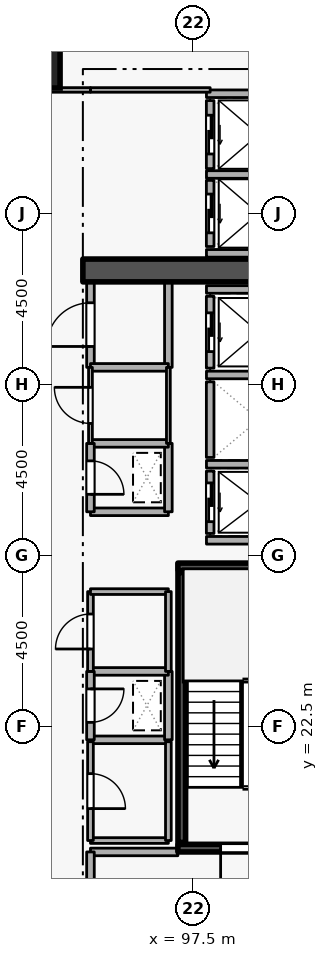
"""IFC4 building model, lengths in metres.
Left out: names, types, materials, properties, quantities, classifications, styles, units other than length and angle.
Written with IfcOpenShell. Run it as: python <this file> out.ifc"""

import sys

from ifc_helpers import new_model, si_unit, direction, frame, frame_2d, origin, origin_2d, place, context, subcontext, project, spatial, rectangle, extrude, element, fill, save


model = new_model("IFC4")
c1 = context("Model", 3, precision=1e-05, world=origin(), true_north=direction((0.0, 1.0)))
c2 = subcontext(c1, "Body", "Model", "MODEL_VIEW")
j1 = project(units=[si_unit("LENGTHUNIT", "METRE"), si_unit("PLANEANGLEUNIT", "RADIAN")], contexts=[c1])
p1 = place(None, origin())
s1 = spatial("IfcSite", under=j1, at=p1, CompositionType="ELEMENT")
p2 = place(p1, origin())
s2 = spatial("IfcBuilding", under=s1, at=p2, CompositionType="ELEMENT")
p3 = place(p2, frame((0.0, 0.0, 60.9)))
s3 = spatial("IfcBuildingStorey", under=s2, at=p3, CompositionType="ELEMENT", Elevation=60.9)
p4 = place(p3, frame((94.6, 34.5, 0.0), z_axis=(0.0, 0.0, 1.0), x_axis=(1.0, 0.0, 0.0)))
e1 = element("IfcWall", 1, at=p4, inside=s3, PredefinedType="SHEAR", context=c2, shape_type="SweptSolid", body=[
    extrude(rectangle(XDim=5.7, YDim=0.6, at=frame_2d((2.85, 0.0))), origin(), (0.0, 0.0, 1.0), 3.6),
])
p5 = place(p3, frame((93.3, 40.0, 0.0), z_axis=(0.0, 0.0, 1.0), x_axis=(1.0, 0.0, 0.0)))
e2 = element("IfcColumn", 2, at=p5, inside=s3, PredefinedType="COLUMN", context=c2, shape_type="SweptSolid", body=[
    extrude(rectangle(XDim=1.4, YDim=1.4, at=origin_2d()), origin(), (0.0, 0.0, 1.0), 3.6),
])
p6 = place(p3, frame((97.95, 29.22, 0.0), z_axis=(0.0, 0.0, 1.0), x_axis=(0.0, -1.0, 0.0)))
e3 = element("IfcWall", 3, at=p6, inside=s3, PredefinedType="STANDARD", context=c2, shape_type="SweptSolid", body=[
    extrude(rectangle(XDim=1.64, YDim=0.2, at=frame_2d((0.82, 0.0))), origin(), (0.0, 0.0, 1.0), 3.34),
])
p7 = place(p6, frame((0.31, 0.0, 0.0)))
e4 = element("IfcOpeningElement", 4, at=p7, cuts=e3, PredefinedType="OPENING", context=c2, shape_type="SweptSolid", body=[
    extrude(rectangle(XDim=1.02, YDim=2.06, at=frame_2d((0.51, 1.03))), frame((0.0, 0.11, 0.0), z_axis=(0.0, -1.0, 0.0), x_axis=(1.0, 0.0, 0.0)), (0.0, 0.0, 1.0), 0.22),
])
p8 = place(p3, frame((97.95, 31.57, 0.0), z_axis=(0.0, 0.0, 1.0), x_axis=(0.0, -1.0, 0.0)))
e5 = element("IfcWall", 5, at=p8, inside=s3, PredefinedType="STANDARD", context=c2, shape_type="SweptSolid", body=[
    extrude(rectangle(XDim=1.99, YDim=0.2, at=frame_2d((0.995, 0.0))), origin(), (0.0, 0.0, 1.0), 3.34),
])
p9 = place(p3, frame((97.95, 33.82, 0.0), z_axis=(0.0, 0.0, 1.0), x_axis=(0.0, -1.0, 0.0)))
e6 = element("IfcWall", 6, at=p9, inside=s3, PredefinedType="STANDARD", context=c2, shape_type="SweptSolid", body=[
    extrude(rectangle(XDim=1.89, YDim=0.2, at=frame_2d((0.945, 0.0))), origin(), (0.0, 0.0, 1.0), 3.34),
])
p10 = place(p9, frame((0.435, 0.0, 0.0)))
e7 = element("IfcOpeningElement", 7, at=p10, cuts=e6, PredefinedType="OPENING", context=c2, shape_type="SweptSolid", body=[
    extrude(rectangle(XDim=1.02, YDim=2.06, at=frame_2d((0.51, 1.03))), frame((0.0, 0.11, 0.0), z_axis=(0.0, -1.0, 0.0), x_axis=(1.0, 0.0, 0.0)), (0.0, 0.0, 1.0), 0.22),
])
p11 = place(p3, frame((97.95, 36.87, 0.0), z_axis=(0.0, 0.0, 1.0), x_axis=(0.0, -1.0, 0.0)))
e8 = element("IfcWall", 8, at=p11, inside=s3, PredefinedType="STANDARD", context=c2, shape_type="SweptSolid", body=[
    extrude(rectangle(XDim=1.74, YDim=0.2, at=frame_2d((0.87, 0.0))), origin(), (0.0, 0.0, 1.0), 3.34),
])
p12 = place(p11, frame((0.36, 0.0, 0.0)))
e9 = element("IfcOpeningElement", 9, at=p12, cuts=e8, PredefinedType="OPENING", context=c2, shape_type="SweptSolid", body=[
    extrude(rectangle(XDim=1.02, YDim=2.06, at=frame_2d((0.51, 1.03))), frame((0.0, 0.11, 0.0), z_axis=(0.0, -1.0, 0.0), x_axis=(1.0, 0.0, 0.0)), (0.0, 0.0, 1.0), 0.22),
])
p13 = place(p3, frame((97.95, 38.97, 0.0), z_axis=(0.0, 0.0, 1.0), x_axis=(0.0, -1.0, 0.0)))
e10 = element("IfcWall", 10, at=p13, inside=s3, PredefinedType="STANDARD", context=c2, shape_type="SweptSolid", body=[
    extrude(rectangle(XDim=1.79, YDim=0.2, at=frame_2d((0.895, 0.0))), origin(), (0.0, 0.0, 1.0), 3.34),
])
p14 = place(p13, frame((0.385, 0.0, 0.0)))
e11 = element("IfcOpeningElement", 11, at=p14, cuts=e10, PredefinedType="OPENING", context=c2, shape_type="SweptSolid", body=[
    extrude(rectangle(XDim=1.02, YDim=2.06, at=frame_2d((0.51, 1.03))), frame((0.0, 0.11, 0.0), z_axis=(0.0, -1.0, 0.0), x_axis=(1.0, 0.0, 0.0)), (0.0, 0.0, 1.0), 0.22),
])
for number, where, z_axis, x_axis in (
    (12, (97.852, 29.4, 0.0), (0.0, 0.0, 1.0), (1.0, 0.0, 0.0)),
    (13, (97.852, 27.4, 0.0), (0.0, 0.0, 1.0), (1.0, 0.0, 0.0)),
    (14, (97.852, 31.75, 0.0), (0.0, 0.0, 1.0), (1.0, 0.0, 0.0)),
    (15, (97.852, 34.0, 0.0), (0.0, 0.0, 1.0), (1.0, 0.0, 0.0)),
):
    element("IfcWall", number, at=place(p3, frame(where, z_axis=z_axis, x_axis=x_axis)), inside=s3, PredefinedType="STANDARD", context=c2, shape_type="SweptSolid", body=[
        extrude(rectangle(XDim=2.436, YDim=0.2, at=frame_2d((1.218, 0.0))), origin(), (0.0, 0.0, 1.0), 3.34),
    ])
for number, where, z_axis, x_axis in (
    (16, (97.852, 37.025, 0.0), (0.0, 0.0, 1.0), (1.0, 0.0, 0.0)),
    (17, (97.852, 34.95, 0.0), (0.0, 0.0, 1.0), (1.0, 0.0, 0.0)),
):
    element("IfcWall", number, at=place(p3, frame(where, z_axis=z_axis, x_axis=x_axis)), inside=s3, PredefinedType="STANDARD", context=c2, shape_type="SweptSolid", body=[
        extrude(rectangle(XDim=2.746, YDim=0.2, at=frame_2d((1.373, 0.0))), origin(), (0.0, 0.0, 1.0), 3.34),
    ])
p15 = place(p3, frame((97.852, 39.15, 0.0), z_axis=(0.0, 0.0, 1.0), x_axis=(1.0, 0.0, 0.0)))
e18 = element("IfcWall", 18, at=p15, inside=s3, PredefinedType="STANDARD", context=c2, shape_type="SweptSolid", body=[
    extrude(rectangle(XDim=2.636, YDim=0.2, at=frame_2d((1.318, 0.0))), origin(), (0.0, 0.0, 1.0), 3.34),
])
p16 = place(p3, frame((100.45, 19.3, 0.0), z_axis=(0.0, 0.0, 1.0), x_axis=(-1.0, 0.0, 0.0)))
e19 = element("IfcWall", 19, at=p16, inside=s3, PredefinedType="SHEAR", context=c2, shape_type="SweptSolid", body=[
    extrude(rectangle(XDim=3.35, YDim=0.2, at=frame_2d((1.675, 0.0))), origin(), (0.0, 0.0, 1.0), 3.6),
])
p17 = place(p16, frame((1.125, 0.0, 0.0)))
e20 = element("IfcOpeningElement", 20, at=p17, cuts=e19, PredefinedType="OPENING", context=c2, shape_type="SweptSolid", body=[
    extrude(rectangle(XDim=1.1, YDim=2.1, at=frame_2d((0.55, 1.05))), frame((0.0, 0.11, 0.0), z_axis=(0.0, -1.0, 0.0), x_axis=(1.0, 0.0, 0.0)), (0.0, 0.0, 1.0), 0.22),
])
p18 = place(p3, frame((97.1, 26.7, 0.0), z_axis=(0.0, 0.0, 1.0), x_axis=(1.0, 0.0, 0.0)))
e21 = element("IfcWall", 21, at=p18, inside=s3, PredefinedType="SHEAR", context=c2, shape_type="SweptSolid", body=[
    extrude(rectangle(XDim=3.35, YDim=0.2, at=frame_2d((1.675, 0.0))), origin(), (0.0, 0.0, 1.0), 3.6),
])
p19 = place(p3, frame((97.203, 26.55, 0.0), z_axis=(0.0, 0.0, 1.0), x_axis=(0.0, -1.0, 0.0)))
e22 = element("IfcWall", 22, at=p19, inside=s3, PredefinedType="SHEAR", context=c2, shape_type="SweptSolid", body=[
    extrude(rectangle(XDim=7.1, YDim=0.2, at=frame_2d((3.55, 0.0))), origin(), (0.0, 0.0, 1.0), 3.6),
])
p20 = place(p3, frame((97.1, 19.2, 0.0), z_axis=(0.0, 0.0, 1.0), x_axis=(-1.0, 0.0, 0.0)))
e23 = element("IfcWall", 23, at=p20, inside=s3, PredefinedType="STANDARD", context=c2, shape_type="SweptSolid", body=[
    extrude(rectangle(XDim=2.3, YDim=0.2, at=frame_2d((1.15, 0.0))), origin(), (0.0, 0.0, 1.0), 2.545),
])
p21 = place(p3, frame((94.8, 19.2, 0.0), z_axis=(0.0, 0.0, 1.0), x_axis=(0.0, -1.0, 0.0)))
e24 = element("IfcWall", 24, at=p21, inside=s3, PredefinedType="STANDARD", context=c2, shape_type="SweptSolid", body=[
    extrude(rectangle(XDim=2.5, YDim=0.2, at=frame_2d((1.25, 0.0))), origin(), (0.0, 0.0, 1.0), 3.34),
])
p22 = place(p3, frame((94.8, 28.15, 0.0), z_axis=(0.0, 0.0, 1.0), x_axis=(1.0, 0.0, 0.0)))
e25 = element("IfcWall", 25, at=p22, inside=s3, PredefinedType="STANDARD", context=c2, shape_type="SweptSolid", body=[
    extrude(rectangle(XDim=2.05, YDim=0.2, at=frame_2d((1.025, 0.0))), origin(), (0.0, 0.0, 1.0), 3.34),
])
p23 = place(p3, frame((96.85, 28.15, 0.0), z_axis=(0.0, 0.0, 1.0), x_axis=(0.0, 1.0, 0.0)))
e26 = element("IfcWall", 26, at=p23, inside=s3, PredefinedType="STANDARD", context=c2, shape_type="SweptSolid", body=[
    extrude(rectangle(XDim=1.8, YDim=0.2, at=frame_2d((0.9, 0.0))), origin(), (0.0, 0.0, 1.0), 3.34),
])
p24 = place(p3, frame((96.85, 29.95, 0.0), z_axis=(0.0, 0.0, 1.0), x_axis=(-1.0, 0.0, 0.0)))
e27 = element("IfcWall", 27, at=p24, inside=s3, PredefinedType="STANDARD", context=c2, shape_type="SweptSolid", body=[
    extrude(rectangle(XDim=2.05, YDim=0.2, at=frame_2d((1.025, 0.0))), origin(), (0.0, 0.0, 1.0), 3.34),
])
p25 = place(p3, frame((94.8, 29.95, 0.0), z_axis=(0.0, 0.0, 1.0), x_axis=(0.0, -1.0, 0.0)))
e28 = element("IfcWall", 28, at=p25, inside=s3, PredefinedType="STANDARD", context=c2, shape_type="SweptSolid", body=[
    extrude(rectangle(XDim=1.8, YDim=0.2, at=frame_2d((0.9, 0.0))), origin(), (0.0, 0.0, 1.0), 3.34),
])
p26 = place(p25, frame((0.46, 0.0, 0.0)))
e29 = element("IfcOpeningElement", 29, at=p26, cuts=e28, PredefinedType="OPENING", context=c2, shape_type="SweptSolid", body=[
    extrude(rectangle(XDim=0.88, YDim=2.04, at=frame_2d((0.44, 1.02))), frame((0.0, 0.11, 0.0), z_axis=(0.0, -1.0, 0.0), x_axis=(1.0, 0.0, 0.0)), (0.0, 0.0, 1.0), 0.22),
])
p27 = place(p3, frame((94.8, 22.15, 0.0), z_axis=(0.0, 0.0, 1.0), x_axis=(1.0, 0.0, 0.0)))
e30 = element("IfcWall", 30, at=p27, inside=s3, PredefinedType="STANDARD", context=c2, shape_type="SweptSolid", body=[
    extrude(rectangle(XDim=2.05, YDim=0.2, at=frame_2d((1.025, 0.0))), origin(), (0.0, 0.0, 1.0), 3.34),
])
p28 = place(p3, frame((96.85, 22.15, 0.0), z_axis=(0.0, 0.0, 1.0), x_axis=(0.0, 1.0, 0.0)))
e31 = element("IfcWall", 31, at=p28, inside=s3, PredefinedType="STANDARD", context=c2, shape_type="SweptSolid", body=[
    extrude(rectangle(XDim=1.8, YDim=0.2, at=frame_2d((0.9, 0.0))), origin(), (0.0, 0.0, 1.0), 3.34),
])
p29 = place(p3, frame((96.85, 23.95, 0.0), z_axis=(0.0, 0.0, 1.0), x_axis=(-1.0, 0.0, 0.0)))
e32 = element("IfcWall", 32, at=p29, inside=s3, PredefinedType="STANDARD", context=c2, shape_type="SweptSolid", body=[
    extrude(rectangle(XDim=2.05, YDim=0.2, at=frame_2d((1.025, 0.0))), origin(), (0.0, 0.0, 1.0), 3.34),
])
p30 = place(p3, frame((94.8, 23.95, 0.0), z_axis=(0.0, 0.0, 1.0), x_axis=(0.0, -1.0, 0.0)))
e33 = element("IfcWall", 33, at=p30, inside=s3, PredefinedType="STANDARD", context=c2, shape_type="SweptSolid", body=[
    extrude(rectangle(XDim=1.8, YDim=0.2, at=frame_2d((0.9, 0.0))), origin(), (0.0, 0.0, 1.0), 3.34),
])
p31 = place(p30, frame((0.46, 0.0, 0.0)))
e34 = element("IfcOpeningElement", 34, at=p31, cuts=e33, PredefinedType="OPENING", context=c2, shape_type="SweptSolid", body=[
    extrude(rectangle(XDim=0.88, YDim=2.04, at=frame_2d((0.44, 1.02))), frame((0.0, 0.11, 0.0), z_axis=(0.0, -1.0, 0.0), x_axis=(1.0, 0.0, 0.0)), (0.0, 0.0, 1.0), 0.22),
])
p32 = place(p3, frame((94.8, 31.95, 0.0), z_axis=(0.0, 0.0, 1.0), x_axis=(0.0, 1.0, 0.0)))
e35 = element("IfcWall", 35, at=p32, inside=s3, PredefinedType="STANDARD", context=c2, shape_type="SweptSolid", body=[
    extrude(rectangle(XDim=2.25, YDim=0.2, at=frame_2d((1.125, 0.0))), origin(), (0.0, 0.0, 1.0), 3.34),
])
p33 = place(p32, frame((0.55, 0.0, 0.0)))
e36 = element("IfcOpeningElement", 36, at=p33, cuts=e35, PredefinedType="OPENING", context=c2, shape_type="SweptSolid", body=[
    extrude(rectangle(XDim=1.15, YDim=2.1, at=frame_2d((0.575, 1.05))), frame((0.0, 0.11, 0.0), z_axis=(0.0, -1.0, 0.0), x_axis=(1.0, 0.0, 0.0)), (0.0, 0.0, 1.0), 0.22),
])
p34 = place(p3, frame((96.85, 34.2, 0.0), z_axis=(0.0, 0.0, 1.0), x_axis=(0.0, -1.0, 0.0)))
e37 = element("IfcWall", 37, at=p34, inside=s3, PredefinedType="STANDARD", context=c2, shape_type="SweptSolid", body=[
    extrude(rectangle(XDim=2.25, YDim=0.2, at=frame_2d((1.125, 0.0))), origin(), (0.0, 0.0, 1.0), 3.34),
])
p35 = place(p3, frame((96.85, 31.95, 0.0), z_axis=(0.0, 0.0, 1.0), x_axis=(-1.0, 0.0, 0.0)))
e38 = element("IfcWall", 38, at=p35, inside=s3, PredefinedType="STANDARD", context=c2, shape_type="SweptSolid", body=[
    extrude(rectangle(XDim=2.05, YDim=0.2, at=frame_2d((1.025, 0.0))), origin(), (0.0, 0.0, 1.0), 3.34),
])
p36 = place(p3, frame((94.8, 19.5, 0.0), z_axis=(0.0, 0.0, 1.0), x_axis=(1.0, 0.0, 0.0)))
e39 = element("IfcWall", 39, at=p36, inside=s3, PredefinedType="PARTITIONING", context=c2, shape_type="SweptSolid", body=[
    extrude(rectangle(XDim=2.05, YDim=0.15, at=frame_2d((1.025, 0.0))), origin(), (0.0, 0.0, 1.0), 2.545),
])
p37 = place(p3, frame((96.85, 19.5, 0.0), z_axis=(0.0, 0.0, 1.0), x_axis=(0.0, 1.0, 0.0)))
e40 = element("IfcWall", 40, at=p37, inside=s3, PredefinedType="PARTITIONING", context=c2, shape_type="SweptSolid", body=[
    extrude(rectangle(XDim=2.6, YDim=0.15, at=frame_2d((1.3, 0.0))), origin(), (0.0, 0.0, 1.0), 3.34),
])
p38 = place(p3, frame((94.8, 22.1, 0.0), z_axis=(0.0, 0.0, 1.0), x_axis=(0.0, -1.0, 0.0)))
e41 = element("IfcWall", 41, at=p38, inside=s3, PredefinedType="PARTITIONING", context=c2, shape_type="SweptSolid", body=[
    extrude(rectangle(XDim=2.6, YDim=0.15, at=frame_2d((1.3, 0.0))), origin(), (0.0, 0.0, 1.0), 3.34),
])
p39 = place(p38, frame((0.84, 0.0, 0.0)))
e42 = element("IfcOpeningElement", 42, at=p39, cuts=e41, PredefinedType="OPENING", context=c2, shape_type="SweptSolid", body=[
    extrude(rectangle(XDim=0.92, YDim=2.08, at=frame_2d((0.46, 1.04))), frame((0.0, 0.085, 0.0), z_axis=(0.0, -1.0, 0.0), x_axis=(1.0, 0.0, 0.0)), (0.0, 0.0, 1.0), 0.17),
])
p40 = place(p3, frame((94.8, 23.95, 0.0), z_axis=(0.0, 0.0, 1.0), x_axis=(0.0, 1.0, 0.0)))
e43 = element("IfcWall", 43, at=p40, inside=s3, PredefinedType="PARTITIONING", context=c2, shape_type="SweptSolid", body=[
    extrude(rectangle(XDim=2.1, YDim=0.15, at=frame_2d((1.05, 0.0))), origin(), (0.0, 0.0, 1.0), 3.34),
])
p41 = place(p40, frame((0.59, 0.0, 0.0)))
e44 = element("IfcOpeningElement", 44, at=p41, cuts=e43, PredefinedType="OPENING", context=c2, shape_type="SweptSolid", body=[
    extrude(rectangle(XDim=0.92, YDim=2.08, at=frame_2d((0.46, 1.04))), frame((0.0, 0.085, 0.0), z_axis=(0.0, -1.0, 0.0), x_axis=(1.0, 0.0, 0.0)), (0.0, 0.0, 1.0), 0.17),
])
p42 = place(p3, frame((94.8, 26.05, 0.0), z_axis=(0.0, 0.0, 1.0), x_axis=(1.0, 0.0, 0.0)))
e45 = element("IfcWall", 45, at=p42, inside=s3, PredefinedType="PARTITIONING", context=c2, shape_type="SweptSolid", body=[
    extrude(rectangle(XDim=2.05, YDim=0.15, at=frame_2d((1.025, 0.0))), origin(), (0.0, 0.0, 1.0), 3.34),
])
p43 = place(p3, frame((96.85, 26.05, 0.0), z_axis=(0.0, 0.0, 1.0), x_axis=(0.0, -1.0, 0.0)))
e46 = element("IfcWall", 46, at=p43, inside=s3, PredefinedType="PARTITIONING", context=c2, shape_type="SweptSolid", body=[
    extrude(rectangle(XDim=2.1, YDim=0.15, at=frame_2d((1.05, 0.0))), origin(), (0.0, 0.0, 1.0), 3.34),
])
p44 = place(p3, frame((94.8, 29.95, 0.0), z_axis=(0.0, 0.0, 1.0), x_axis=(0.0, 1.0, 0.0)))
e47 = element("IfcWall", 47, at=p44, inside=s3, PredefinedType="PARTITIONING", context=c2, shape_type="SweptSolid", body=[
    extrude(rectangle(XDim=2.0, YDim=0.1, at=frame_2d((1.0, 0.0))), origin(), (0.0, 0.0, 1.0), 3.34),
])
p45 = place(p44, frame((0.525, 0.0, 0.0)))
e48 = element("IfcOpeningElement", 48, at=p45, cuts=e47, PredefinedType="OPENING", context=c2, shape_type="SweptSolid", body=[
    extrude(rectangle(XDim=0.95, YDim=2.1, at=frame_2d((0.475, 1.05))), frame((0.0, 0.06, 0.0), z_axis=(0.0, -1.0, 0.0), x_axis=(1.0, 0.0, 0.0)), (0.0, 0.0, 1.0), 0.12),
])
p46 = place(p3, frame((96.85, 31.95, 0.0), z_axis=(0.0, 0.0, 1.0), x_axis=(0.0, -1.0, 0.0)))
e49 = element("IfcWall", 49, at=p46, inside=s3, PredefinedType="PARTITIONING", context=c2, shape_type="SweptSolid", body=[
    extrude(rectangle(XDim=2.0, YDim=0.1, at=frame_2d((1.0, 0.0))), origin(), (0.0, 0.0, 1.0), 3.34),
])
p47 = place(p3, frame((97.95, 39.25, 0.0), z_axis=(0.0, 0.0, 1.0), x_axis=(-1.0, 0.0, 0.0)))
e50 = element("IfcWall", 50, at=p47, inside=s3, PredefinedType="PARTITIONING", context=c2, shape_type="SweptSolid", body=[
    extrude(rectangle(XDim=3.15, YDim=0.12, at=frame_2d((1.575, 0.0))), origin(), (0.0, 0.0, 1.0), 3.34),
])
p48 = place(p3, frame((94.8, 39.25, 0.0), z_axis=(0.0, 0.0, 1.0), x_axis=(-1.0, 0.0, 0.0)))
e51 = element("IfcWall", 51, at=p48, inside=s3, PredefinedType="PARTITIONING", context=c2, shape_type="SweptSolid", body=[
    extrude(rectangle(XDim=1.85, YDim=0.12, at=frame_2d((0.925, 0.0))), origin(), (0.0, 0.0, 1.0), 3.34),
])
p49 = place(p7, origin())
e52 = element("IfcDoor", 52, at=p49, inside=s3, OperationType="SLIDING_TO_LEFT", PredefinedType="DOOR", context=c2, shape_type="SweptSolid", body=[
    extrude(rectangle(XDim=1.02, YDim=2.06, at=frame_2d((0.51, 1.03))), frame((0.0, 0.025, 0.0), z_axis=(0.0, -1.0, 0.0), x_axis=(1.0, 0.0, 0.0)), (0.0, 0.0, 1.0), 0.05),
])
fill(e4, e52)
p50 = place(p10, origin())
e53 = element("IfcDoor", 53, at=p50, inside=s3, OperationType="SLIDING_TO_LEFT", PredefinedType="DOOR", context=c2, shape_type="SweptSolid", body=[
    extrude(rectangle(XDim=1.02, YDim=2.06, at=frame_2d((0.51, 1.03))), frame((0.0, 0.025, 0.0), z_axis=(0.0, -1.0, 0.0), x_axis=(1.0, 0.0, 0.0)), (0.0, 0.0, 1.0), 0.05),
])
fill(e7, e53)
p51 = place(p12, origin())
e54 = element("IfcDoor", 54, at=p51, inside=s3, OperationType="SLIDING_TO_LEFT", PredefinedType="DOOR", context=c2, shape_type="SweptSolid", body=[
    extrude(rectangle(XDim=1.02, YDim=2.06, at=frame_2d((0.51, 1.03))), frame((0.0, 0.025, 0.0), z_axis=(0.0, -1.0, 0.0), x_axis=(1.0, 0.0, 0.0)), (0.0, 0.0, 1.0), 0.05),
])
fill(e9, e54)
p52 = place(p14, origin())
e55 = element("IfcDoor", 55, at=p52, inside=s3, OperationType="SLIDING_TO_LEFT", PredefinedType="DOOR", context=c2, shape_type="SweptSolid", body=[
    extrude(rectangle(XDim=1.02, YDim=2.06, at=frame_2d((0.51, 1.03))), frame((0.0, 0.025, 0.0), z_axis=(0.0, -1.0, 0.0), x_axis=(1.0, 0.0, 0.0)), (0.0, 0.0, 1.0), 0.05),
])
fill(e11, e55)
p53 = place(p17, origin())
e56 = element("IfcDoor", 56, at=p53, inside=s3, OperationType="SINGLE_SWING_RIGHT", PredefinedType="DOOR", context=c2, shape_type="SweptSolid", body=[
    extrude(rectangle(XDim=1.1, YDim=2.1, at=frame_2d((0.55, 1.05))), frame((0.0, 0.025, 0.0), z_axis=(0.0, -1.0, 0.0), x_axis=(1.0, 0.0, 0.0)), (0.0, 0.0, 1.0), 0.05),
])
fill(e20, e56)
p54 = place(p26, origin())
e57 = element("IfcDoor", 57, at=p54, inside=s3, OperationType="SINGLE_SWING_RIGHT", PredefinedType="DOOR", context=c2, shape_type="SweptSolid", body=[
    extrude(rectangle(XDim=0.88, YDim=2.04, at=frame_2d((0.44, 1.02))), frame((0.0, 0.025, 0.0), z_axis=(0.0, -1.0, 0.0), x_axis=(1.0, 0.0, 0.0)), (0.0, 0.0, 1.0), 0.05),
])
fill(e29, e57)
p55 = place(p31, origin())
e58 = element("IfcDoor", 58, at=p55, inside=s3, OperationType="SINGLE_SWING_LEFT", PredefinedType="DOOR", context=c2, shape_type="SweptSolid", body=[
    extrude(rectangle(XDim=0.88, YDim=2.04, at=frame_2d((0.44, 1.02))), frame((0.0, 0.025, 0.0), z_axis=(0.0, -1.0, 0.0), x_axis=(1.0, 0.0, 0.0)), (0.0, 0.0, 1.0), 0.05),
])
fill(e34, e58)
p56 = place(p39, origin())
e59 = element("IfcDoor", 59, at=p56, inside=s3, OperationType="SINGLE_SWING_RIGHT", PredefinedType="DOOR", context=c2, shape_type="SweptSolid", body=[
    extrude(rectangle(XDim=0.92, YDim=2.08, at=frame_2d((0.46, 1.04))), frame((0.0, 0.025, 0.0), z_axis=(0.0, -1.0, 0.0), x_axis=(1.0, 0.0, 0.0)), (0.0, 0.0, 1.0), 0.05),
])
fill(e42, e59)
p57 = place(p41, origin())
e60 = element("IfcDoor", 60, at=p57, inside=s3, OperationType="SINGLE_SWING_LEFT", PredefinedType="DOOR", context=c2, shape_type="SweptSolid", body=[
    extrude(rectangle(XDim=0.92, YDim=2.08, at=frame_2d((0.46, 1.04))), frame((0.0, 0.025, 0.0), z_axis=(0.0, -1.0, 0.0), x_axis=(1.0, 0.0, 0.0)), (0.0, 0.0, 1.0), 0.05),
])
fill(e44, e60)
p58 = place(p45, origin())
e61 = element("IfcDoor", 61, at=p58, inside=s3, OperationType="SINGLE_SWING_RIGHT", PredefinedType="DOOR", context=c2, shape_type="SweptSolid", body=[
    extrude(rectangle(XDim=0.95, YDim=2.1, at=frame_2d((0.475, 1.05))), frame((0.0, 0.025, 0.0), z_axis=(0.0, -1.0, 0.0), x_axis=(1.0, 0.0, 0.0)), (0.0, 0.0, 1.0), 0.05),
])
fill(e48, e61)
p59 = place(p33, origin())
e62 = element("IfcDoor", 62, at=p59, inside=s3, OperationType="SINGLE_SWING_LEFT", PredefinedType="DOOR", context=c2, shape_type="SweptSolid", body=[
    extrude(rectangle(XDim=1.15, YDim=2.1, at=frame_2d((0.575, 1.05))), frame((0.0, 0.025, 0.0), z_axis=(0.0, -1.0, 0.0), x_axis=(1.0, 0.0, 0.0)), (0.0, 0.0, 1.0), 0.05),
])
fill(e36, e62)
save(model, sys.argv[1])
